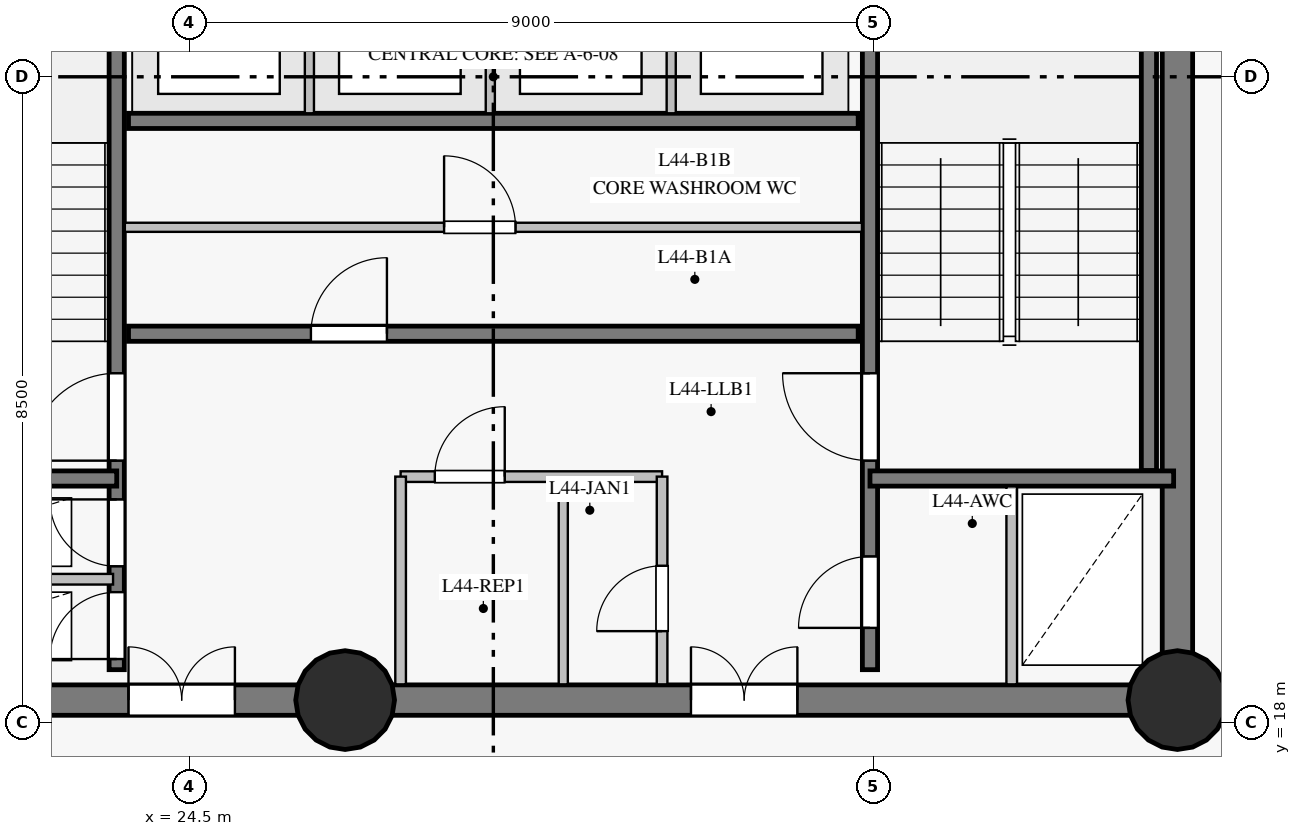
"""IFC4 building model, lengths in metres.
Left out: names, types, materials, properties, quantities, classifications, styles, units other than length and angle.
Written with IfcOpenShell. Run it as: python <this file> out.ifc"""

import sys

from ifc_helpers import new_model, si_unit, direction, frame, frame_2d, origin, origin_with_axes, origin_2d, place, context, subcontext, project, spatial, rectangle, circle, extrude, source, transform, mapped, element, fill, save


model = new_model("IFC4")
c1 = context("Model", 3, precision=1e-05, world=origin(), true_north=direction((0.0, 1.0)))
c2 = subcontext(c1, "Body", "Model", "MODEL_VIEW")
j1 = project(units=[si_unit("LENGTHUNIT", "METRE"), si_unit("PLANEANGLEUNIT", "RADIAN")], contexts=[c1])
p1 = place(None, origin())
s1 = spatial("IfcSite", under=j1, at=p1, CompositionType="ELEMENT")
p2 = place(p1, origin())
s2 = spatial("IfcBuilding", under=s1, at=p2, CompositionType="ELEMENT")
p3 = place(p2, frame((0.0, 0.0, 156.55)))
s3 = spatial("IfcBuildingStorey", under=s2, at=p3, CompositionType="ELEMENT", Elevation=156.55)
p4 = place(p3, frame((19.5, 18.3, 0.0), z_axis=(0.0, 0.0, 1.0), x_axis=(1.0, 0.0, 0.0)))
e1 = element("IfcWall", 1, at=p4, inside=s3, PredefinedType="SHEAR", context=c2, shape_type="SweptSolid", body=[
    extrude(rectangle(XDim=7.05, YDim=0.4, at=frame_2d((3.525, 0.0))), origin(), (0.0, 0.0, 1.0), 2.825),
])
p5 = place(p4, frame((4.2, 0.0, 0.0)))
e2 = element("IfcOpeningElement", 2, at=p5, cuts=e1, PredefinedType="OPENING", context=c2, shape_type="SweptSolid", body=[
    extrude(rectangle(XDim=1.4, YDim=2.2, at=frame_2d((0.7, 1.1))), frame((0.0, 0.21, 0.0), z_axis=(0.0, -1.0, 0.0), x_axis=(1.0, 0.0, 0.0)), (0.0, 0.0, 1.0), 0.42),
])
p6 = place(p3, frame((26.55, 18.3, 0.0), z_axis=(0.0, 0.0, 1.0), x_axis=(1.0, 0.0, 0.0)))
e3 = element("IfcWall", 3, at=p6, inside=s3, PredefinedType="SHEAR", context=c2, shape_type="SweptSolid", body=[
    extrude(rectangle(XDim=10.95, YDim=0.4, at=frame_2d((5.475, 0.0))), origin(), (0.0, 0.0, 1.0), 2.825),
])
p7 = place(p6, frame((4.55, 0.0, 0.0)))
e4 = element("IfcOpeningElement", 4, at=p7, cuts=e3, PredefinedType="OPENING", context=c2, shape_type="SweptSolid", body=[
    extrude(rectangle(XDim=1.4, YDim=2.2, at=frame_2d((0.7, 1.1))), frame((0.0, 0.21, 0.0), z_axis=(0.0, -1.0, 0.0), x_axis=(1.0, 0.0, 0.0)), (0.0, 0.0, 1.0), 0.42),
])
p8 = place(p3, frame((37.5, 18.3, 0.0), z_axis=(0.0, 0.0, 1.0), x_axis=(0.0, 1.0, 0.0)))
e5 = element("IfcWall", 5, at=p8, inside=s3, PredefinedType="SHEAR", context=c2, shape_type="SweptSolid", body=[
    extrude(rectangle(XDim=16.4, YDim=0.4, at=frame_2d((8.2, 0.0))), origin(), (0.0, 0.0, 1.0), 2.825),
])
p9 = place(p8, frame((14.15, 0.0, 0.0)))
e6 = element("IfcOpeningElement", 6, at=p9, cuts=e5, PredefinedType="OPENING", context=c2, shape_type="SweptSolid", body=[
    extrude(rectangle(XDim=1.2, YDim=2.15, at=frame_2d((0.6, 1.075))), frame((0.0, 0.21, 0.0), z_axis=(0.0, -1.0, 0.0), x_axis=(1.0, 0.0, 0.0)), (0.0, 0.0, 1.0), 0.42),
])
m1 = source(origin_with_axes(), c2, "Body", "SweptSolid", [
    extrude(circle(Radius=0.65, at=origin_2d()), origin(), (0.0, 0.0, 1.0), 3.05),
])
for number, where, z_axis, x_axis in (
    (7, (26.55, 18.3, 0.0), (0.0, 0.0, 1.0), (1.0, 0.0, 0.0)),
    (8, (37.5, 18.3, 0.0), (0.0, 0.0, 1.0), (1.0, 0.0, 0.0)),
):
    element("IfcColumn", number, at=place(p3, frame(where, z_axis=z_axis, x_axis=x_axis)), inside=s3, PredefinedType="COLUMN", context=c2, shape_type="MappedRepresentation", body=[
        mapped(m1, transform((0.0, 0.0, 0.0), scale=1.0)),
    ])
p10 = place(p3, frame((38.012, 5.417, 0.0), z_axis=(0.0, 0.0, 1.0), x_axis=(0.421677791248, 0.906745741853, 0.0)))
e9 = element("IfcWall", 9, at=p10, inside=s3, PredefinedType="SOLIDWALL", context=c2, shape_type="SweptSolid", body=[
    extrude(rectangle(XDim=13.927, YDim=0.28, at=frame_2d((6.963, 0.0))), origin(), (0.0, 0.0, 1.0), 2.825),
])
p11 = place(p10, frame((1.884, 0.0, 0.85)))
e10 = element("IfcOpeningElement", 10, at=p11, cuts=e9, PredefinedType="OPENING", context=c2, shape_type="SweptSolid", body=[
    extrude(rectangle(XDim=1.75, YDim=1.65, at=frame_2d((0.875, 0.825))), frame((0.0, 0.15, 0.0), z_axis=(0.0, -1.0, 0.0), x_axis=(1.0, 0.0, 0.0)), (0.0, 0.0, 1.0), 0.3),
])
p12 = place(p10, frame((6.846, 0.0, 0.85)))
e11 = element("IfcOpeningElement", 11, at=p12, cuts=e9, PredefinedType="OPENING", context=c2, shape_type="SweptSolid", body=[
    extrude(rectangle(XDim=1.75, YDim=1.65, at=frame_2d((0.875, 0.825))), frame((0.0, 0.15, 0.0), z_axis=(0.0, -1.0, 0.0), x_axis=(1.0, 0.0, 0.0)), (0.0, 0.0, 1.0), 0.3),
])
p13 = place(p10, frame((10.729, 0.0, 0.85)))
e12 = element("IfcOpeningElement", 12, at=p13, cuts=e9, PredefinedType="OPENING", context=c2, shape_type="SweptSolid", body=[
    extrude(rectangle(XDim=1.75, YDim=1.65, at=frame_2d((0.875, 0.825))), frame((0.0, 0.15, 0.0), z_axis=(0.0, -1.0, 0.0), x_axis=(1.0, 0.0, 0.0)), (0.0, 0.0, 1.0), 0.3),
])
p14 = place(p3, frame((23.545, 18.7, 0.0), z_axis=(0.0, 0.0, 1.0), x_axis=(0.0, 1.0, 0.0)))
e13 = element("IfcWall", 13, at=p14, inside=s3, PredefinedType="SHEAR", context=c2, shape_type="SweptSolid", body=[
    extrude(rectangle(XDim=15.6, YDim=0.2, at=frame_2d((7.8, 0.0))), origin(), (0.0, 0.0, 1.0), 2.825),
])
p15 = place(p14, frame((2.75, 0.0, 0.0)))
e14 = element("IfcOpeningElement", 14, at=p15, cuts=e13, PredefinedType="OPENING", context=c2, shape_type="SweptSolid", body=[
    extrude(rectangle(XDim=1.15, YDim=2.15, at=frame_2d((0.575, 1.075))), frame((0.0, 0.11, 0.0), z_axis=(0.0, -1.0, 0.0), x_axis=(1.0, 0.0, 0.0)), (0.0, 0.0, 1.0), 0.22),
])
p16 = place(p14, frame((0.14, 0.0, 0.0)))
e15 = element("IfcOpeningElement", 15, at=p16, cuts=e13, PredefinedType="OPENING", context=c2, shape_type="SweptSolid", body=[
    extrude(rectangle(XDim=0.88, YDim=2.1, at=frame_2d((0.44, 1.05))), frame((0.0, 0.11, 0.0), z_axis=(0.0, -1.0, 0.0), x_axis=(1.0, 0.0, 0.0)), (0.0, 0.0, 1.0), 0.22),
])
p17 = place(p14, frame((1.36, 0.0, 0.0)))
e16 = element("IfcOpeningElement", 16, at=p17, cuts=e13, PredefinedType="OPENING", context=c2, shape_type="SweptSolid", body=[
    extrude(rectangle(XDim=0.88, YDim=2.1, at=frame_2d((0.44, 1.05))), frame((0.0, 0.11, 0.0), z_axis=(0.0, -1.0, 0.0), x_axis=(1.0, 0.0, 0.0)), (0.0, 0.0, 1.0), 0.22),
])
p18 = place(p14, frame((12.1, 0.0, 0.0)))
e17 = element("IfcOpeningElement", 17, at=p18, cuts=e13, PredefinedType="OPENING", context=c2, shape_type="SweptSolid", body=[
    extrude(rectangle(XDim=1.12, YDim=2.15, at=frame_2d((0.56, 1.075))), frame((0.0, 0.11, 0.0), z_axis=(0.0, -1.0, 0.0), x_axis=(1.0, 0.0, 0.0)), (0.0, 0.0, 1.0), 0.22),
])
p19 = place(p14, frame((14.05, 0.0, 0.0)))
e18 = element("IfcOpeningElement", 18, at=p19, cuts=e13, PredefinedType="OPENING", context=c2, shape_type="SweptSolid", body=[
    extrude(rectangle(XDim=1.12, YDim=2.15, at=frame_2d((0.56, 1.075))), frame((0.0, 0.11, 0.0), z_axis=(0.0, -1.0, 0.0), x_axis=(1.0, 0.0, 0.0)), (0.0, 0.0, 1.0), 0.22),
])
p20 = place(p3, frame((33.455, 18.7, 0.0), z_axis=(0.0, 0.0, 1.0), x_axis=(0.0, 1.0, 0.0)))
e19 = element("IfcWall", 19, at=p20, inside=s3, PredefinedType="SHEAR", context=c2, shape_type="SweptSolid", body=[
    extrude(rectangle(XDim=15.6, YDim=0.2, at=frame_2d((7.8, 0.0))), origin(), (0.0, 0.0, 1.0), 2.825),
])
p21 = place(p20, frame((2.75, 0.0, 0.0)))
e20 = element("IfcOpeningElement", 20, at=p21, cuts=e19, PredefinedType="OPENING", context=c2, shape_type="SweptSolid", body=[
    extrude(rectangle(XDim=1.15, YDim=2.15, at=frame_2d((0.575, 1.075))), frame((0.0, 0.11, 0.0), z_axis=(0.0, -1.0, 0.0), x_axis=(1.0, 0.0, 0.0)), (0.0, 0.0, 1.0), 0.22),
])
p22 = place(p20, frame((0.55, 0.0, 0.0)))
e21 = element("IfcOpeningElement", 21, at=p22, cuts=e19, PredefinedType="OPENING", context=c2, shape_type="SweptSolid", body=[
    extrude(rectangle(XDim=0.94, YDim=2.1, at=frame_2d((0.47, 1.05))), frame((0.0, 0.11, 0.0), z_axis=(0.0, -1.0, 0.0), x_axis=(1.0, 0.0, 0.0)), (0.0, 0.0, 1.0), 0.22),
])
p23 = place(p3, frame((23.7, 23.12, 0.0), z_axis=(0.0, 0.0, 1.0), x_axis=(1.0, 0.0, 0.0)))
e22 = element("IfcWall", 22, at=p23, inside=s3, PredefinedType="SHEAR", context=c2, shape_type="SweptSolid", body=[
    extrude(rectangle(XDim=9.6, YDim=0.2, at=frame_2d((4.8, 0.0))), origin(), (0.0, 0.0, 1.0), 2.825),
])
p24 = place(p23, frame((2.4, 0.0, 0.0)))
e23 = element("IfcOpeningElement", 23, at=p24, cuts=e22, PredefinedType="OPENING", context=c2, shape_type="SweptSolid", body=[
    extrude(rectangle(XDim=1.0, YDim=2.15, at=frame_2d((0.5, 1.075))), frame((0.0, 0.11, 0.0), z_axis=(0.0, -1.0, 0.0), x_axis=(1.0, 0.0, 0.0)), (0.0, 0.0, 1.0), 0.22),
])
p25 = place(p3, frame((23.7, 25.92, 0.0), z_axis=(0.0, 0.0, 1.0), x_axis=(1.0, 0.0, 0.0)))
e24 = element("IfcWall", 24, at=p25, inside=s3, PredefinedType="SHEAR", context=c2, shape_type="SweptSolid", body=[
    extrude(rectangle(XDim=9.6, YDim=0.2, at=frame_2d((4.8, 0.0))), origin(), (0.0, 0.0, 1.0), 2.825),
])
p26 = place(p3, frame((37.125, 21.32, 0.0), z_axis=(0.0, 0.0, 1.0), x_axis=(0.0, 1.0, 0.0)))
e25 = element("IfcWall", 25, at=p26, inside=s3, PredefinedType="SHEAR", context=c2, shape_type="SweptSolid", body=[
    extrude(rectangle(XDim=7.5, YDim=0.2, at=frame_2d((3.75, 0.0))), origin(), (0.0, 0.0, 1.0), 2.825),
])
for number, where, z_axis, x_axis in (
    (26, (33.455, 21.215, 0.0), (0.0, 0.0, 1.0), (1.0, 0.0, 0.0)),
    (27, (19.55, 21.215, 0.0), (0.0, 0.0, 1.0), (1.0, 0.0, 0.0)),
):
    element("IfcWall", number, at=place(p3, frame(where, z_axis=z_axis, x_axis=x_axis)), inside=s3, PredefinedType="SHEAR", context=c2, shape_type="SweptSolid", body=[
        extrude(rectangle(XDim=3.995, YDim=0.2, at=frame_2d((1.998, 0.0))), origin(), (0.0, 0.0, 1.0), 2.825),
    ])
p27 = place(p3, frame((23.652, 24.52, 0.0), z_axis=(0.0, 0.0, 1.0), x_axis=(1.0, 0.0, 0.0)))
e28 = element("IfcWall", 28, at=p27, inside=s3, PredefinedType="PARTITIONING", context=c2, shape_type="SweptSolid", body=[
    extrude(rectangle(XDim=9.698, YDim=0.12, at=frame_2d((4.849, 0.0))), origin(), (0.0, 0.0, 1.0), 2.825),
])
p28 = place(p27, frame((4.2, 0.0, 0.0)))
e29 = element("IfcOpeningElement", 29, at=p28, cuts=e28, PredefinedType="OPENING", context=c2, shape_type="SweptSolid", body=[
    extrude(rectangle(XDim=0.94, YDim=2.1, at=frame_2d((0.47, 1.05))), frame((0.0, 0.07, 0.0), z_axis=(0.0, -1.0, 0.0), x_axis=(1.0, 0.0, 0.0)), (0.0, 0.0, 1.0), 0.14),
])
p29 = place(p3, frame((19.707, 19.89, 0.0), z_axis=(0.0, 0.0, 1.0), x_axis=(1.0, 0.0, 0.0)))
e30 = element("IfcWall", 30, at=p29, inside=s3, PredefinedType="PARTITIONING", context=c2, shape_type="SweptSolid", body=[
    extrude(rectangle(XDim=3.79, YDim=0.14, at=frame_2d((1.895, 0.0))), origin(), (0.0, 0.0, 1.0), 2.825),
])
p30 = place(p3, frame((27.28, 21.24, 0.0), z_axis=(0.0, 0.0, 1.0), x_axis=(1.0, 0.0, 0.0)))
e31 = element("IfcWall", 31, at=p30, inside=s3, PredefinedType="PARTITIONING", context=c2, shape_type="SweptSolid", body=[
    extrude(rectangle(XDim=3.44, YDim=0.14, at=frame_2d((1.72, 0.0))), origin(), (0.0, 0.0, 1.0), 2.825),
])
p31 = place(p30, frame((0.45, 0.0, 0.0)))
e32 = element("IfcOpeningElement", 32, at=p31, cuts=e31, PredefinedType="OPENING", context=c2, shape_type="SweptSolid", body=[
    extrude(rectangle(XDim=0.92, YDim=2.1, at=frame_2d((0.46, 1.05))), frame((0.0, 0.08, 0.0), z_axis=(0.0, -1.0, 0.0), x_axis=(1.0, 0.0, 0.0)), (0.0, 0.0, 1.0), 0.16),
])
p32 = place(p3, frame((27.28, 18.507, 0.0), z_axis=(0.0, 0.0, 1.0), x_axis=(0.0, 1.0, 0.0)))
e33 = element("IfcWall", 33, at=p32, inside=s3, PredefinedType="PARTITIONING", context=c2, shape_type="SweptSolid", body=[
    extrude(rectangle(XDim=2.733, YDim=0.14, at=frame_2d((1.366, 0.0))), origin(), (0.0, 0.0, 1.0), 2.825),
])
p33 = place(p3, frame((30.72, 18.507, 0.0), z_axis=(0.0, 0.0, 1.0), x_axis=(0.0, 1.0, 0.0)))
e34 = element("IfcWall", 34, at=p33, inside=s3, PredefinedType="PARTITIONING", context=c2, shape_type="SweptSolid", body=[
    extrude(rectangle(XDim=2.733, YDim=0.14, at=frame_2d((1.366, 0.0))), origin(), (0.0, 0.0, 1.0), 2.825),
])
p34 = place(p33, frame((0.7, 0.0, 0.0)))
e35 = element("IfcOpeningElement", 35, at=p34, cuts=e34, PredefinedType="OPENING", context=c2, shape_type="SweptSolid", body=[
    extrude(rectangle(XDim=0.86, YDim=2.1, at=frame_2d((0.43, 1.05))), frame((0.0, 0.08, 0.0), z_axis=(0.0, -1.0, 0.0), x_axis=(1.0, 0.0, 0.0)), (0.0, 0.0, 1.0), 0.16),
])
for number, where, z_axis, x_axis in (
    (36, (26.08, 26.02, 0.0), (0.0, 0.0, 1.0), (0.0, 1.0, 0.0)),
    (37, (28.46, 26.02, 0.0), (0.0, 0.0, 1.0), (0.0, 1.0, 0.0)),
    (38, (30.84, 26.02, 0.0), (0.0, 0.0, 1.0), (0.0, 1.0, 0.0)),
):
    element("IfcWall", number, at=place(p3, frame(where, z_axis=z_axis, x_axis=x_axis)), inside=s3, PredefinedType="PARTITIONING", context=c2, shape_type="SweptSolid", body=[
        extrude(rectangle(XDim=2.6, YDim=0.12, at=frame_2d((1.3, 0.0))), origin(), (0.0, 0.0, 1.0), 2.825),
    ])
p35 = place(p3, frame((29.42, 18.507, 0.0), z_axis=(0.0, 0.0, 1.0), x_axis=(0.0, 1.0, 0.0)))
e39 = element("IfcWall", 39, at=p35, inside=s3, PredefinedType="PARTITIONING", context=c2, shape_type="SweptSolid", body=[
    extrude(rectangle(XDim=2.662, YDim=0.12, at=frame_2d((1.331, 0.0))), origin(), (0.0, 0.0, 1.0), 2.825),
])
p36 = place(p3, frame((35.32, 18.507, 0.0), z_axis=(0.0, 0.0, 1.0), x_axis=(0.0, 1.0, 0.0)))
e40 = element("IfcWall", 40, at=p36, inside=s3, PredefinedType="PARTITIONING", context=c2, shape_type="SweptSolid", body=[
    extrude(rectangle(XDim=2.604, YDim=0.14, at=frame_2d((1.302, 0.0))), origin(), (0.0, 0.0, 1.0), 2.825),
])
m2 = source(origin_with_axes(), c2, "Body", "SweptSolid", [
    extrude(rectangle(XDim=1.15, YDim=2.15, at=frame_2d((0.575, 1.075))), frame((0.0, 0.025, 0.0), z_axis=(0.0, -1.0, 0.0), x_axis=(1.0, 0.0, 0.0)), (0.0, 0.0, 1.0), 0.05),
])
p37 = place(p15, origin())
e41 = element("IfcDoor", 41, at=p37, inside=s3, OperationType="SINGLE_SWING_LEFT", PredefinedType="DOOR", context=c2, shape_type="MappedRepresentation", body=[
    mapped(m2, transform((0.0, 0.0, 0.0), scale=1.0)),
])
fill(e14, e41)
p38 = place(p21, origin())
e42 = element("IfcDoor", 42, at=p38, inside=s3, OperationType="SINGLE_SWING_RIGHT", PredefinedType="DOOR", context=c2, shape_type="MappedRepresentation", body=[
    mapped(m2, transform((0.0, 0.0, 0.0), scale=1.0)),
])
fill(e20, e42)
m3 = source(origin_with_axes(), c2, "Body", "SweptSolid", [
    extrude(rectangle(XDim=0.88, YDim=2.1, at=frame_2d((0.44, 1.05))), frame((0.0, 0.025, 0.0), z_axis=(0.0, -1.0, 0.0), x_axis=(1.0, 0.0, 0.0)), (0.0, 0.0, 1.0), 0.05),
])
p39 = place(p16, origin())
e43 = element("IfcDoor", 43, at=p39, inside=s3, OperationType="SINGLE_SWING_LEFT", PredefinedType="DOOR", context=c2, shape_type="MappedRepresentation", body=[
    mapped(m3, transform((0.0, 0.0, 0.0), scale=1.0)),
])
fill(e15, e43)
p40 = place(p17, origin())
e44 = element("IfcDoor", 44, at=p40, inside=s3, OperationType="SINGLE_SWING_RIGHT", PredefinedType="DOOR", context=c2, shape_type="MappedRepresentation", body=[
    mapped(m3, transform((0.0, 0.0, 0.0), scale=1.0)),
])
fill(e16, e44)
m4 = source(origin_with_axes(), c2, "Body", "SweptSolid", [
    extrude(rectangle(XDim=1.4, YDim=2.2, at=frame_2d((0.7, 1.1))), frame((0.0, 0.025, 0.0), z_axis=(0.0, -1.0, 0.0), x_axis=(1.0, 0.0, 0.0)), (0.0, 0.0, 1.0), 0.05),
])
p41 = place(p5, origin())
e45 = element("IfcDoor", 45, at=p41, inside=s3, OperationType="DOUBLE_DOOR_SINGLE_SWING", PredefinedType="DOOR", context=c2, shape_type="MappedRepresentation", body=[
    mapped(m4, transform((0.0, 0.0, 0.0), scale=1.0)),
])
fill(e2, e45)
p42 = place(p7, origin())
e46 = element("IfcDoor", 46, at=p42, inside=s3, OperationType="DOUBLE_DOOR_SINGLE_SWING", PredefinedType="DOOR", context=c2, shape_type="MappedRepresentation", body=[
    mapped(m4, transform((0.0, 0.0, 0.0), scale=1.0)),
])
fill(e4, e46)
m5 = source(origin_with_axes(), c2, "Body", "SweptSolid", [
    extrude(rectangle(XDim=0.94, YDim=2.1, at=frame_2d((0.47, 1.05))), frame((0.0, 0.025, 0.0), z_axis=(0.0, -1.0, 0.0), x_axis=(1.0, 0.0, 0.0)), (0.0, 0.0, 1.0), 0.05),
])
p43 = place(p22, origin())
e47 = element("IfcDoor", 47, at=p43, inside=s3, OperationType="SINGLE_SWING_LEFT", PredefinedType="DOOR", context=c2, shape_type="MappedRepresentation", body=[
    mapped(m5, transform((0.0, 0.0, 0.0), scale=1.0)),
])
fill(e21, e47)
m6 = source(origin_with_axes(), c2, "Body", "SweptSolid", [
    extrude(rectangle(XDim=0.92, YDim=2.1, at=frame_2d((0.46, 1.05))), frame((0.0, 0.025, 0.0), z_axis=(0.0, -1.0, 0.0), x_axis=(1.0, 0.0, 0.0)), (0.0, 0.0, 1.0), 0.05),
])
p44 = place(p31, origin())
e48 = element("IfcDoor", 48, at=p44, inside=s3, OperationType="SINGLE_SWING_RIGHT", PredefinedType="DOOR", context=c2, shape_type="MappedRepresentation", body=[
    mapped(m6, transform((0.0, 0.0, 0.0), scale=1.0)),
])
fill(e32, e48)
m7 = source(origin_with_axes(), c2, "Body", "SweptSolid", [
    extrude(rectangle(XDim=0.86, YDim=2.1, at=frame_2d((0.43, 1.05))), frame((0.0, 0.025, 0.0), z_axis=(0.0, -1.0, 0.0), x_axis=(1.0, 0.0, 0.0)), (0.0, 0.0, 1.0), 0.05),
])
p45 = place(p34, origin())
e49 = element("IfcDoor", 49, at=p45, inside=s3, OperationType="SINGLE_SWING_LEFT", PredefinedType="DOOR", context=c2, shape_type="MappedRepresentation", body=[
    mapped(m7, transform((0.0, 0.0, 0.0), scale=1.0)),
])
fill(e35, e49)
m8 = source(origin_with_axes(), c2, "Body", "SweptSolid", [
    extrude(rectangle(XDim=1.0, YDim=2.15, at=frame_2d((0.5, 1.075))), frame((0.0, 0.025, 0.0), z_axis=(0.0, -1.0, 0.0), x_axis=(1.0, 0.0, 0.0)), (0.0, 0.0, 1.0), 0.05),
])
p46 = place(p24, origin())
e50 = element("IfcDoor", 50, at=p46, inside=s3, OperationType="SINGLE_SWING_RIGHT", PredefinedType="DOOR", context=c2, shape_type="MappedRepresentation", body=[
    mapped(m8, transform((0.0, 0.0, 0.0), scale=1.0)),
])
fill(e23, e50)
p47 = place(p28, origin())
e51 = element("IfcDoor", 51, at=p47, inside=s3, OperationType="SINGLE_SWING_LEFT", PredefinedType="DOOR", context=c2, shape_type="MappedRepresentation", body=[
    mapped(m5, transform((0.0, 0.0, 0.0), scale=1.0)),
])
fill(e29, e51)
save(model, sys.argv[1])
